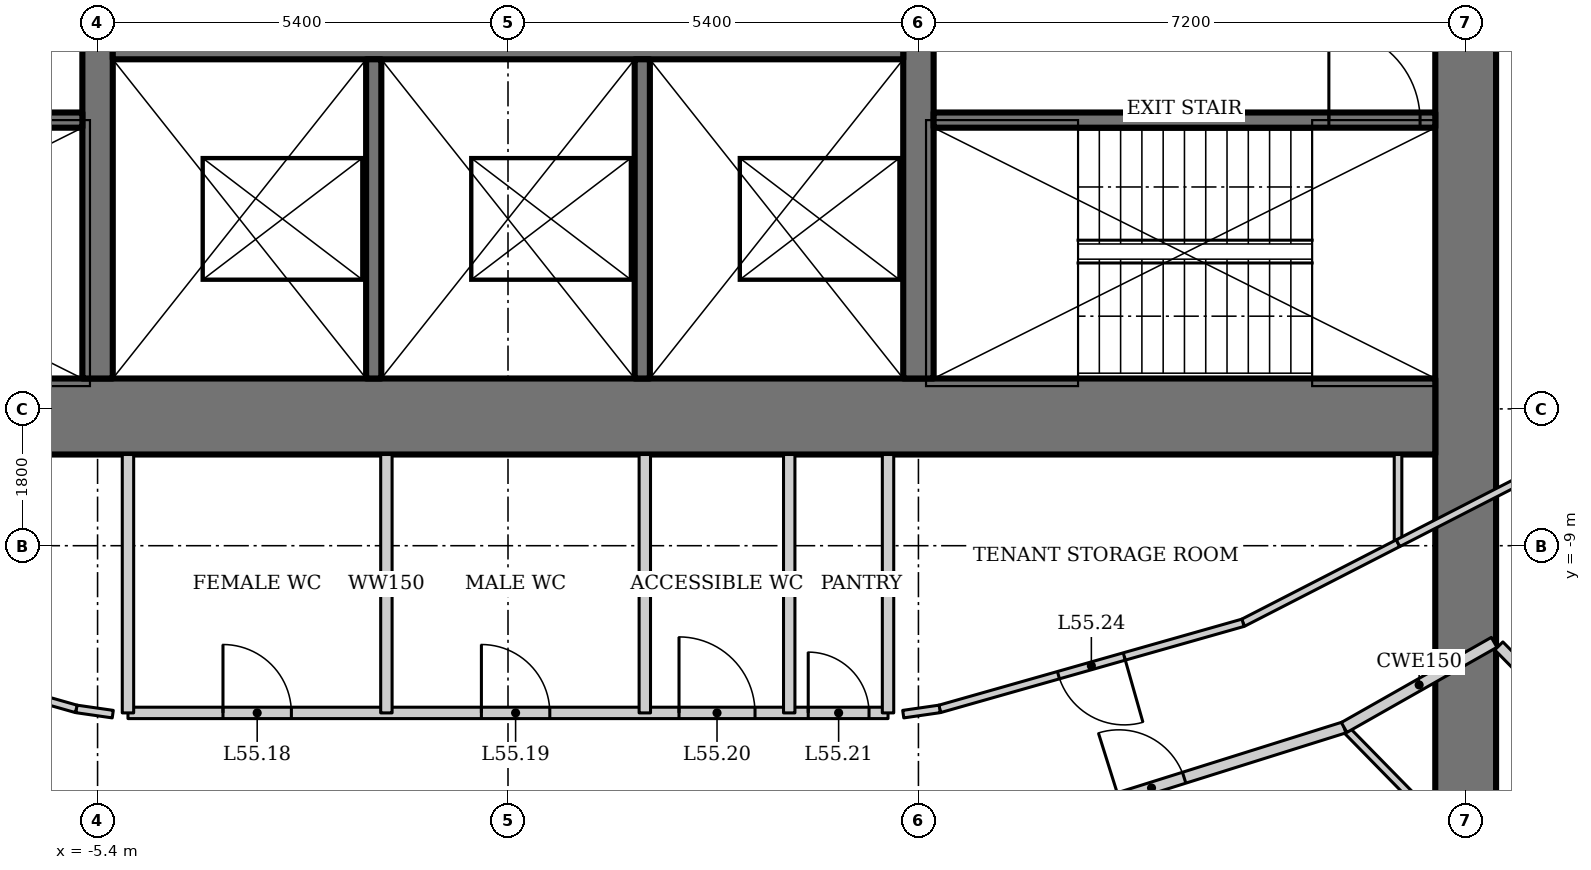
"""IFC4 building model, lengths in metres.
Left out: names, types, materials, properties, quantities, classifications, styles, units other than length and angle.
Written with IfcOpenShell. Run it as: python <this file> out.ifc"""

import sys

from ifc_helpers import new_model, si_unit, direction, frame, frame_2d, origin, place, context, subcontext, project, spatial, rectangle, extrude, element, fill, save


model = new_model("IFC4")
c1 = context("Model", 3, precision=1e-05, world=origin(), true_north=direction((0.0, 1.0)))
c2 = subcontext(c1, "Body", "Model", "MODEL_VIEW")
j1 = project(units=[si_unit("LENGTHUNIT", "METRE"), si_unit("PLANEANGLEUNIT", "RADIAN")], contexts=[c1])
p1 = place(None, origin())
s1 = spatial("IfcSite", under=j1, at=p1, CompositionType="ELEMENT")
p2 = place(p1, origin())
s2 = spatial("IfcBuilding", under=s1, at=p2, CompositionType="ELEMENT")
p3 = place(p2, frame((0.0, 0.0, 236.8)))
s3 = spatial("IfcBuildingStorey", under=s2, at=p3, CompositionType="ELEMENT", Elevation=236.8)
p4 = place(p3, frame((12.6, -13.0, 0.0), z_axis=(0.0, 0.0, 1.0), x_axis=(0.0, 1.0, 0.0)))
e1 = element("IfcWall", 1, at=p4, inside=s3, PredefinedType="SHEAR", context=c2, shape_type="SweptSolid", body=[
    extrude(rectangle(XDim=26.0, YDim=0.8, at=frame_2d((13.0, 0.0))), origin(), (0.0, 0.0, 1.0), 4.2),
])
p5 = place(p4, frame((12.1, 0.0, 0.0)))
e2 = element("IfcOpeningElement", 2, at=p5, cuts=e1, PredefinedType="OPENING", context=c2, shape_type="SweptSolid", body=[
    extrude(rectangle(XDim=1.8, YDim=2.1, at=frame_2d((0.9, 1.05))), frame((0.0, 0.41, 0.0), z_axis=(0.0, -1.0, 0.0), x_axis=(1.0, 0.0, 0.0)), (0.0, 0.0, 1.0), 0.82),
])
p6 = place(p3, frame((-12.2, -7.3, 0.0), z_axis=(0.0, 0.0, 1.0), x_axis=(1.0, 0.0, 0.0)))
e3 = element("IfcWall", 3, at=p6, inside=s3, PredefinedType="SHEAR", context=c2, shape_type="SweptSolid", body=[
    extrude(rectangle(XDim=24.4, YDim=1.0, at=frame_2d((12.2, 0.0))), origin(), (0.0, 0.0, 1.0), 4.2),
])
p7 = place(p3, frame((5.4, -6.8, 0.0), z_axis=(0.0, 0.0, 1.0), x_axis=(0.0, 1.0, 0.0)))
e4 = element("IfcWall", 4, at=p7, inside=s3, PredefinedType="SHEAR", context=c2, shape_type="SweptSolid", body=[
    extrude(rectangle(XDim=14.6, YDim=0.4, at=frame_2d((7.3, 0.0))), origin(), (0.0, 0.0, 1.0), 4.2),
])
p8 = place(p7, frame((5.9, 0.0, 0.0)))
e5 = element("IfcOpeningElement", 5, at=p8, cuts=e4, PredefinedType="OPENING", context=c2, shape_type="SweptSolid", body=[
    extrude(rectangle(XDim=1.8, YDim=2.1, at=frame_2d((0.9, 1.05))), frame((0.0, 0.21, 0.0), z_axis=(0.0, -1.0, 0.0), x_axis=(1.0, 0.0, 0.0)), (0.0, 0.0, 1.0), 0.42),
])
p9 = place(p3, frame((-5.4, 7.8, 0.0), z_axis=(0.0, 0.0, 1.0), x_axis=(0.0, -1.0, 0.0)))
e6 = element("IfcWall", 6, at=p9, inside=s3, PredefinedType="SHEAR", context=c2, shape_type="SweptSolid", body=[
    extrude(rectangle(XDim=14.6, YDim=0.4, at=frame_2d((7.3, 0.0))), origin(), (0.0, 0.0, 1.0), 4.2),
])
p10 = place(p9, frame((6.4, 0.0, 0.0)))
e7 = element("IfcOpeningElement", 7, at=p10, cuts=e6, PredefinedType="OPENING", context=c2, shape_type="SweptSolid", body=[
    extrude(rectangle(XDim=1.8, YDim=2.1, at=frame_2d((0.9, 1.05))), frame((0.0, 0.21, 0.0), z_axis=(0.0, -1.0, 0.0), x_axis=(1.0, 0.0, 0.0)), (0.0, 0.0, 1.0), 0.42),
])
p11 = place(p3, frame((-5.2, -2.4, 0.0), z_axis=(0.0, 0.0, 1.0), x_axis=(1.0, 0.0, 0.0)))
e8 = element("IfcWall", 8, at=p11, inside=s3, PredefinedType="SHEAR", context=c2, shape_type="SweptSolid", body=[
    extrude(rectangle(XDim=10.4, YDim=0.4, at=frame_2d((5.2, 0.0))), origin(), (0.0, 0.0, 1.0), 4.2),
])
p12 = place(p11, frame((1.683, 0.0, 0.0)))
e9 = element("IfcOpeningElement", 9, at=p12, cuts=e8, PredefinedType="OPENING", context=c2, shape_type="SweptSolid", body=[
    extrude(rectangle(XDim=1.1, YDim=2.2, at=frame_2d((0.55, 1.1))), frame((0.0, 0.21, 0.0), z_axis=(0.0, -1.0, 0.0), x_axis=(1.0, 0.0, 0.0)), (0.0, 0.0, 1.0), 0.42),
])
p13 = place(p11, frame((5.217, 0.0, 0.0)))
e10 = element("IfcOpeningElement", 10, at=p13, cuts=e8, PredefinedType="OPENING", context=c2, shape_type="SweptSolid", body=[
    extrude(rectangle(XDim=1.1, YDim=2.2, at=frame_2d((0.55, 1.1))), frame((0.0, 0.21, 0.0), z_axis=(0.0, -1.0, 0.0), x_axis=(1.0, 0.0, 0.0)), (0.0, 0.0, 1.0), 0.42),
])
p14 = place(p11, frame((8.75, 0.0, 0.0)))
e11 = element("IfcOpeningElement", 11, at=p14, cuts=e8, PredefinedType="OPENING", context=c2, shape_type="SweptSolid", body=[
    extrude(rectangle(XDim=1.1, YDim=2.2, at=frame_2d((0.55, 1.1))), frame((0.0, 0.21, 0.0), z_axis=(0.0, -1.0, 0.0), x_axis=(1.0, 0.0, 0.0)), (0.0, 0.0, 1.0), 0.42),
])
for number, where, z_axis, x_axis in (
    (12, (-1.767, -2.6, 0.0), (0.0, 0.0, 1.0), (0.0, -1.0, 0.0)),
    (13, (1.767, -2.6, 0.0), (0.0, 0.0, 1.0), (0.0, -1.0, 0.0)),
):
    element("IfcWall", number, at=place(p3, frame(where, z_axis=z_axis, x_axis=x_axis)), inside=s3, PredefinedType="SOLIDWALL", context=c2, shape_type="SweptSolid", body=[
        extrude(rectangle(XDim=4.2, YDim=0.2, at=frame_2d((2.1, 0.0))), origin(), (0.0, 0.0, 1.0), 4.2),
    ])
p15 = place(p3, frame((5.6, -3.4, 0.0), z_axis=(0.0, 0.0, 1.0), x_axis=(1.0, 0.0, 0.0)))
e14 = element("IfcWall", 14, at=p15, inside=s3, PredefinedType="SHEAR", context=c2, shape_type="SweptSolid", body=[
    extrude(rectangle(XDim=6.6, YDim=0.2, at=frame_2d((3.3, 0.0))), origin(), (0.0, 0.0, 1.0), 4.2),
])
p16 = place(p15, frame((5.2, 0.0, 0.0)))
e15 = element("IfcOpeningElement", 15, at=p16, cuts=e14, PredefinedType="OPENING", context=c2, shape_type="SweptSolid", body=[
    extrude(rectangle(XDim=1.2, YDim=2.1, at=frame_2d((0.6, 1.05))), frame((0.0, 0.11, 0.0), z_axis=(0.0, -1.0, 0.0), x_axis=(1.0, 0.0, 0.0)), (0.0, 0.0, 1.0), 0.22),
])
p17 = place(p3, frame((-5.6, -3.4, 0.0), z_axis=(0.0, 0.0, 1.0), x_axis=(-1.0, 0.0, 0.0)))
e16 = element("IfcWall", 16, at=p17, inside=s3, PredefinedType="SHEAR", context=c2, shape_type="SweptSolid", body=[
    extrude(rectangle(XDim=6.6, YDim=0.2, at=frame_2d((3.3, 0.0))), origin(), (0.0, 0.0, 1.0), 4.2),
])
p18 = place(p17, frame((5.2, 0.0, 0.0)))
e17 = element("IfcOpeningElement", 17, at=p18, cuts=e16, PredefinedType="OPENING", context=c2, shape_type="SweptSolid", body=[
    extrude(rectangle(XDim=1.2, YDim=2.1, at=frame_2d((0.6, 1.05))), frame((0.0, 0.11, 0.0), z_axis=(0.0, -1.0, 0.0), x_axis=(1.0, 0.0, 0.0)), (0.0, 0.0, 1.0), 0.22),
])
p19 = place(p3, frame((15.709, -16.199, 0.0), z_axis=(0.0, 0.0, 1.0), x_axis=(-0.699758297028, 0.71437967898, 0.0)))
e18 = element("IfcWall", 18, at=p19, inside=s3, PredefinedType="PARTITIONING", context=c2, shape_type="SweptSolid", body=[
    extrude(rectangle(XDim=6.729, YDim=0.1, at=frame_2d((3.365, 0.0))), origin(), (0.0, 0.0, 1.0), 3.41),
])
p20 = place(p3, frame((6.521, -12.799, 0.0), z_axis=(0.0, 0.0, 1.0), x_axis=(0.954031103669, 0.299707612903, 0.0)))
e19 = element("IfcWall", 19, at=p20, inside=s3, PredefinedType="PARTITIONING", context=c2, shape_type="SweptSolid", body=[
    extrude(rectangle(XDim=4.695, YDim=0.15, at=frame_2d((2.348, 0.0))), origin(), (0.0, 0.0, 1.0), 4.05),
])
p21 = place(p20, frame((1.589, 0.0, 0.0)))
e20 = element("IfcOpeningElement", 20, at=p21, cuts=e19, PredefinedType="OPENING", context=c2, shape_type="SweptSolid", body=[
    extrude(rectangle(XDim=0.9, YDim=2.1, at=frame_2d((0.45, 1.05))), frame((0.0, 0.085, 0.0), z_axis=(0.0, -1.0, 0.0), x_axis=(1.0, 0.0, 0.0)), (0.0, 0.0, 1.0), 0.17),
])
p22 = place(p3, frame((-5.0, -11.2, 0.0), z_axis=(0.0, 0.0, 1.0), x_axis=(1.0, 0.0, 0.0)))
e21 = element("IfcWall", 21, at=p22, inside=s3, PredefinedType="SOLIDWALL", context=c2, shape_type="SweptSolid", body=[
    extrude(rectangle(XDim=10.0, YDim=0.15, at=frame_2d((5.0, 0.0))), origin(), (0.0, 0.0, 1.0), 4.05),
])
p23 = place(p22, frame((1.25, 0.0, 0.0)))
e22 = element("IfcOpeningElement", 22, at=p23, cuts=e21, PredefinedType="OPENING", context=c2, shape_type="SweptSolid", body=[
    extrude(rectangle(XDim=0.9, YDim=2.1, at=frame_2d((0.45, 1.05))), frame((0.0, 0.085, 0.0), z_axis=(0.0, -1.0, 0.0), x_axis=(1.0, 0.0, 0.0)), (0.0, 0.0, 1.0), 0.17),
])
p24 = place(p22, frame((4.65, 0.0, 0.0)))
e23 = element("IfcOpeningElement", 23, at=p24, cuts=e21, PredefinedType="OPENING", context=c2, shape_type="SweptSolid", body=[
    extrude(rectangle(XDim=0.9, YDim=2.1, at=frame_2d((0.45, 1.05))), frame((0.0, 0.085, 0.0), z_axis=(0.0, -1.0, 0.0), x_axis=(1.0, 0.0, 0.0)), (0.0, 0.0, 1.0), 0.17),
])
p25 = place(p22, frame((7.25, 0.0, 0.0)))
e24 = element("IfcOpeningElement", 24, at=p25, cuts=e21, PredefinedType="OPENING", context=c2, shape_type="SweptSolid", body=[
    extrude(rectangle(XDim=1.0, YDim=2.1, at=frame_2d((0.5, 1.05))), frame((0.0, 0.085, 0.0), z_axis=(0.0, -1.0, 0.0), x_axis=(1.0, 0.0, 0.0)), (0.0, 0.0, 1.0), 0.17),
])
p26 = place(p22, frame((8.95, 0.0, 0.0)))
e25 = element("IfcOpeningElement", 25, at=p26, cuts=e21, PredefinedType="OPENING", context=c2, shape_type="SweptSolid", body=[
    extrude(rectangle(XDim=0.8, YDim=2.1, at=frame_2d((0.4, 1.05))), frame((0.0, 0.085, 0.0), z_axis=(0.0, -1.0, 0.0), x_axis=(1.0, 0.0, 0.0)), (0.0, 0.0, 1.0), 0.17),
])
for number, where, z_axis, x_axis in (
    (26, (-5.0, -7.8, 0.0), (0.0, 0.0, 1.0), (0.0, -1.0, 0.0)),
    (27, (5.0, -7.8, 0.0), (0.0, 0.0, 1.0), (0.0, -1.0, 0.0)),
    (28, (-1.6, -7.8, 0.0), (0.0, 0.0, 1.0), (0.0, -1.0, 0.0)),
):
    element("IfcWall", number, at=place(p3, frame(where, z_axis=z_axis, x_axis=x_axis)), inside=s3, PredefinedType="SOLIDWALL", context=c2, shape_type="SweptSolid", body=[
        extrude(rectangle(XDim=3.4, YDim=0.15, at=frame_2d((1.7, 0.0))), origin(), (0.0, 0.0, 1.0), 4.05),
    ])
p27 = place(p3, frame((1.8, -7.8, 0.0), z_axis=(0.0, 0.0, 1.0), x_axis=(0.0, -1.0, 0.0)))
e29 = element("IfcWall", 29, at=p27, inside=s3, PredefinedType="SOLIDWALL", context=c2, shape_type="SweptSolid", body=[
    extrude(rectangle(XDim=3.4, YDim=0.15, at=frame_2d((1.7, 0.0))), origin(), (0.0, 0.0, 1.0), 3.293),
])
p28 = place(p3, frame((3.7, -7.8, 0.0), z_axis=(0.0, 0.0, 1.0), x_axis=(0.0, -1.0, 0.0)))
e30 = element("IfcWall", 30, at=p28, inside=s3, PredefinedType="SOLIDWALL", context=c2, shape_type="SweptSolid", body=[
    extrude(rectangle(XDim=3.4, YDim=0.15, at=frame_2d((1.7, 0.0))), origin(), (0.0, 0.0, 1.0), 4.05),
])
p29 = place(p3, frame((-5.2, -11.216, 0.0), z_axis=(0.0, 0.0, 1.0), x_axis=(-0.989797891768, 0.142478536811, 0.0)))
e31 = element("IfcWall", 31, at=p29, inside=s3, PredefinedType="PARTITIONING", context=c2, shape_type="SweptSolid", body=[
    extrude(rectangle(XDim=0.485, YDim=0.1, at=frame_2d((0.242, 0.0))), origin(), (0.0, 0.0, 1.0), 4.05),
])
p30 = place(p3, frame((-5.68, -11.147, 0.0), z_axis=(0.0, 0.0, 1.0), x_axis=(-0.961973498971, 0.273142796496, 0.0)))
e32 = element("IfcWall", 32, at=p30, inside=s3, PredefinedType="PARTITIONING", context=c2, shape_type="SweptSolid", body=[
    extrude(rectangle(XDim=4.148, YDim=0.1, at=frame_2d((2.074, 0.0))), origin(), (0.0, 0.0, 1.0), 4.05),
])
p31 = place(p30, frame((1.624, 0.0, 0.0)))
e33 = element("IfcOpeningElement", 33, at=p31, cuts=e32, PredefinedType="OPENING", context=c2, shape_type="SweptSolid", body=[
    extrude(rectangle(XDim=0.9, YDim=2.1, at=frame_2d((0.45, 1.05))), frame((0.0, 0.06, 0.0), z_axis=(0.0, -1.0, 0.0), x_axis=(1.0, 0.0, 0.0)), (0.0, 0.0, 1.0), 0.12),
])
p32 = place(p3, frame((11.71, -7.8, 0.0), z_axis=(0.0, 0.0, 1.0), x_axis=(0.0, -1.0, 0.0)))
e34 = element("IfcWall", 34, at=p32, inside=s3, PredefinedType="PARTITIONING", context=c2, shape_type="SweptSolid", body=[
    extrude(rectangle(XDim=1.167, YDim=0.1, at=frame_2d((0.583, 0.0))), origin(), (0.0, 0.0, 1.0), 4.05),
])
p33 = place(p3, frame((11.71, -8.967, 0.0), z_axis=(0.0, 0.0, 1.0), x_axis=(-0.889605609385, -0.456729525814, 0.0)))
e35 = element("IfcWall", 35, at=p33, inside=s3, PredefinedType="PARTITIONING", context=c2, shape_type="SweptSolid", body=[
    extrude(rectangle(XDim=2.293, YDim=0.1, at=frame_2d((1.146, 0.0))), origin(), (0.0, 0.0, 1.0), 4.05),
])
p34 = place(p3, frame((9.67, -10.014, 0.0), z_axis=(0.0, 0.0, 1.0), x_axis=(-0.961973498971, -0.273142796496, 0.0)))
e36 = element("IfcWall", 36, at=p34, inside=s3, PredefinedType="PARTITIONING", context=c2, shape_type="SweptSolid", body=[
    extrude(rectangle(XDim=4.148, YDim=0.1, at=frame_2d((2.074, 0.0))), origin(), (0.0, 0.0, 1.0), 4.05),
])
p35 = place(p34, frame((1.624, 0.0, 0.0)))
e37 = element("IfcOpeningElement", 37, at=p35, cuts=e36, PredefinedType="OPENING", context=c2, shape_type="SweptSolid", body=[
    extrude(rectangle(XDim=0.9, YDim=2.1, at=frame_2d((0.45, 1.05))), frame((0.0, 0.06, 0.0), z_axis=(0.0, -1.0, 0.0), x_axis=(1.0, 0.0, 0.0)), (0.0, 0.0, 1.0), 0.12),
])
p36 = place(p3, frame((5.68, -11.147, 0.0), z_axis=(0.0, 0.0, 1.0), x_axis=(-0.989797891768, -0.142478536811, 0.0)))
e38 = element("IfcWall", 38, at=p36, inside=s3, PredefinedType="PARTITIONING", context=c2, shape_type="SweptSolid", body=[
    extrude(rectangle(XDim=0.485, YDim=0.1, at=frame_2d((0.242, 0.0))), origin(), (0.0, 0.0, 1.0), 4.05),
])
p37 = place(p3, frame((11.001, -11.392, 0.0), z_axis=(0.0, 0.0, 1.0), x_axis=(0.869722107117, 0.493541747366, 0.0)))
e39 = element("IfcWall", 39, at=p37, inside=s3, PredefinedType="PARTITIONING", context=c2, shape_type="SweptSolid", body=[
    extrude(rectangle(XDim=2.27, YDim=0.15, at=frame_2d((1.135, 0.0))), origin(), (0.0, 0.0, 1.0), 4.05),
])
p38 = place(p3, frame((13.415, -8.092, 0.0), z_axis=(0.0, 0.0, 1.0), x_axis=(-0.889638356137, -0.456665736935, 0.0)))
e40 = element("IfcWall", 40, at=p38, inside=s3, PredefinedType="PARTITIONING", context=c2, shape_type="SweptSolid", body=[
    extrude(rectangle(XDim=1.917, YDim=0.1, at=frame_2d((0.958, 0.0))), origin(), (0.0, 0.0, 1.0), 4.05),
])
p39 = place(p3, frame((14.025, -11.325, 0.0), z_axis=(0.0, 0.0, 1.0), x_axis=(-0.701113567316, 0.713049623606, 0.0)))
e41 = element("IfcWall", 41, at=p39, inside=s3, PredefinedType="PARTITIONING", context=c2, shape_type="SweptSolid", body=[
    extrude(rectangle(XDim=1.411, YDim=0.15, at=frame_2d((0.706, 0.0))), origin(), (0.0, 0.0, 1.0), 4.05),
])
p40 = place(p16, origin())
e42 = element("IfcDoor", 42, at=p40, inside=s3, OperationType="SINGLE_SWING_RIGHT", PredefinedType="DOOR", context=c2, shape_type="SweptSolid", body=[
    extrude(rectangle(XDim=1.2, YDim=2.1, at=frame_2d((0.6, 1.05))), frame((0.0, 0.025, 0.0), z_axis=(0.0, -1.0, 0.0), x_axis=(1.0, 0.0, 0.0)), (0.0, 0.0, 1.0), 0.05),
])
fill(e15, e42)
p41 = place(p23, origin())
e43 = element("IfcDoor", 43, at=p41, inside=s3, OperationType="SINGLE_SWING_LEFT", PredefinedType="DOOR", context=c2, shape_type="SweptSolid", body=[
    extrude(rectangle(XDim=0.9, YDim=2.1, at=frame_2d((0.45, 1.05))), frame((0.0, 0.025, 0.0), z_axis=(0.0, -1.0, 0.0), x_axis=(1.0, 0.0, 0.0)), (0.0, 0.0, 1.0), 0.05),
])
fill(e22, e43)
p42 = place(p24, origin())
e44 = element("IfcDoor", 44, at=p42, inside=s3, OperationType="SINGLE_SWING_LEFT", PredefinedType="DOOR", context=c2, shape_type="SweptSolid", body=[
    extrude(rectangle(XDim=0.9, YDim=2.1, at=frame_2d((0.45, 1.05))), frame((0.0, 0.025, 0.0), z_axis=(0.0, -1.0, 0.0), x_axis=(1.0, 0.0, 0.0)), (0.0, 0.0, 1.0), 0.05),
])
fill(e23, e44)
p43 = place(p25, origin())
e45 = element("IfcDoor", 45, at=p43, inside=s3, OperationType="SINGLE_SWING_LEFT", PredefinedType="DOOR", context=c2, shape_type="SweptSolid", body=[
    extrude(rectangle(XDim=1.0, YDim=2.1, at=frame_2d((0.5, 1.05))), frame((0.0, 0.025, 0.0), z_axis=(0.0, -1.0, 0.0), x_axis=(1.0, 0.0, 0.0)), (0.0, 0.0, 1.0), 0.05),
])
fill(e24, e45)
p44 = place(p26, origin())
e46 = element("IfcDoor", 46, at=p44, inside=s3, OperationType="SINGLE_SWING_LEFT", PredefinedType="DOOR", context=c2, shape_type="SweptSolid", body=[
    extrude(rectangle(XDim=0.8, YDim=2.1, at=frame_2d((0.4, 1.05))), frame((0.0, 0.025, 0.0), z_axis=(0.0, -1.0, 0.0), x_axis=(1.0, 0.0, 0.0)), (0.0, 0.0, 1.0), 0.05),
])
fill(e25, e46)
p45 = place(p35, origin())
e47 = element("IfcDoor", 47, at=p45, inside=s3, OperationType="SINGLE_SWING_LEFT", PredefinedType="DOOR", context=c2, shape_type="SweptSolid", body=[
    extrude(rectangle(XDim=0.9, YDim=2.1, at=frame_2d((0.45, 1.05))), frame((0.0, 0.025, 0.0), z_axis=(0.0, -1.0, 0.0), x_axis=(1.0, 0.0, 0.0)), (0.0, 0.0, 1.0), 0.05),
])
fill(e37, e47)
p46 = place(p21, origin())
e48 = element("IfcDoor", 48, at=p46, inside=s3, OperationType="SINGLE_SWING_LEFT", PredefinedType="DOOR", context=c2, shape_type="SweptSolid", body=[
    extrude(rectangle(XDim=0.9, YDim=2.1, at=frame_2d((0.45, 1.05))), frame((0.0, 0.025, 0.0), z_axis=(0.0, -1.0, 0.0), x_axis=(1.0, 0.0, 0.0)), (0.0, 0.0, 1.0), 0.05),
])
fill(e20, e48)
save(model, sys.argv[1])
